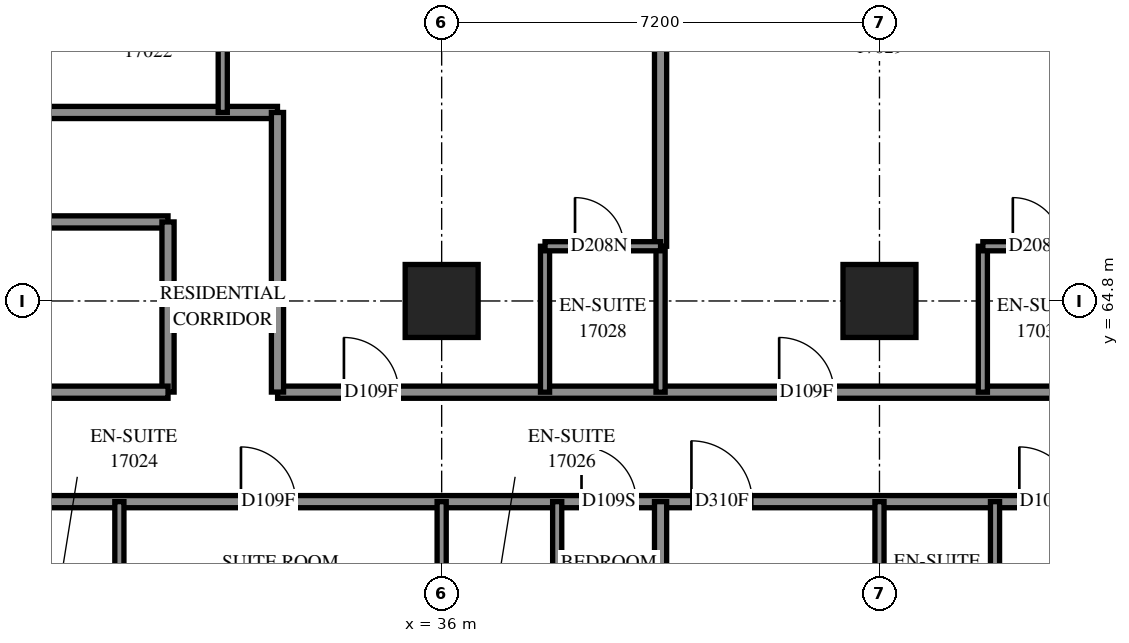
"""IFC4 building model, lengths in metres.
Left out: names, types, materials, properties, quantities, classifications, styles, units other than length and angle.
Written with IfcOpenShell. Run it as: python <this file> out.ifc"""

import sys

from ifc_helpers import new_model, si_unit, direction, frame, frame_2d, origin, origin_2d, place, context, subcontext, project, spatial, rectangle, extrude, element, fill, save


model = new_model("IFC4")
c1 = context("Model", 3, precision=1e-05, world=origin(), true_north=direction((0.0, 1.0)))
c2 = subcontext(c1, "Body", "Model", "MODEL_VIEW")
j1 = project(units=[si_unit("LENGTHUNIT", "METRE"), si_unit("PLANEANGLEUNIT", "RADIAN")], contexts=[c1])
p1 = place(None, origin())
s1 = spatial("IfcSite", under=j1, at=p1, CompositionType="ELEMENT")
p2 = place(p1, origin())
s2 = spatial("IfcBuilding", under=s1, at=p2, CompositionType="ELEMENT")
p3 = place(p2, frame((0.0, 0.0, 64.4)))
s3 = spatial("IfcBuildingStorey", under=s2, at=p3, CompositionType="ELEMENT", Elevation=64.4)
for number, where, z_axis, x_axis in (
    (1, (36.0, 64.8, 0.0), (0.0, 0.0, 1.0), (1.0, 0.0, 0.0)),
    (2, (43.2, 64.8, 0.0), (0.0, 0.0, 1.0), (1.0, 0.0, 0.0)),
):
    element("IfcColumn", number, at=place(p3, frame(where, z_axis=z_axis, x_axis=x_axis)), inside=s3, PredefinedType="COLUMN", context=c2, shape_type="SweptSolid", body=[
        extrude(rectangle(XDim=1.2, YDim=1.2, at=origin_2d()), origin(), (0.0, 0.0, 1.0), 3.1),
    ])
p4 = place(p3, frame((28.8, 61.5, 0.0), z_axis=(0.0, 0.0, 1.0), x_axis=(1.0, 0.0, 0.0)))
e3 = element("IfcWall", 3, at=p4, inside=s3, PredefinedType="PARTITIONING", context=c2, shape_type="SweptSolid", body=[
    extrude(rectangle(XDim=24.3, YDim=0.2, at=frame_2d((12.15, 0.0))), origin(), (0.0, 0.0, 1.0), 3.1),
])
p5 = place(p4, frame((3.899, 0.0, 0.0)))
e4 = element("IfcOpeningElement", 4, at=p5, cuts=e3, PredefinedType="OPENING", context=c2, shape_type="SweptSolid", body=[
    extrude(rectangle(XDim=0.9, YDim=2.1, at=frame_2d((0.45, 1.05))), frame((0.0, 0.11, 0.0), z_axis=(0.0, -1.0, 0.0), x_axis=(1.0, 0.0, 0.0)), (0.0, 0.0, 1.0), 0.22),
])
p6 = place(p4, frame((9.5, 0.0, 0.0)))
e5 = element("IfcOpeningElement", 5, at=p6, cuts=e3, PredefinedType="OPENING", context=c2, shape_type="SweptSolid", body=[
    extrude(rectangle(XDim=0.9, YDim=2.1, at=frame_2d((0.45, 1.05))), frame((0.0, 0.11, 0.0), z_axis=(0.0, -1.0, 0.0), x_axis=(1.0, 0.0, 0.0)), (0.0, 0.0, 1.0), 0.22),
])
p7 = place(p4, frame((11.307, 0.0, 0.0)))
e6 = element("IfcOpeningElement", 6, at=p7, cuts=e3, PredefinedType="OPENING", context=c2, shape_type="SweptSolid", body=[
    extrude(rectangle(XDim=1.0, YDim=2.1, at=frame_2d((0.5, 1.05))), frame((0.0, 0.11, 0.0), z_axis=(0.0, -1.0, 0.0), x_axis=(1.0, 0.0, 0.0)), (0.0, 0.0, 1.0), 0.22),
])
p8 = place(p4, frame((16.7, 0.0, 0.0)))
e7 = element("IfcOpeningElement", 7, at=p8, cuts=e3, PredefinedType="OPENING", context=c2, shape_type="SweptSolid", body=[
    extrude(rectangle(XDim=0.9, YDim=2.1, at=frame_2d((0.45, 1.05))), frame((0.0, 0.11, 0.0), z_axis=(0.0, -1.0, 0.0), x_axis=(1.0, 0.0, 0.0)), (0.0, 0.0, 1.0), 0.22),
])
p9 = place(p4, frame((18.508, 0.0, 0.0)))
e8 = element("IfcOpeningElement", 8, at=p9, cuts=e3, PredefinedType="OPENING", context=c2, shape_type="SweptSolid", body=[
    extrude(rectangle(XDim=1.0, YDim=2.1, at=frame_2d((0.5, 1.05))), frame((0.0, 0.11, 0.0), z_axis=(0.0, -1.0, 0.0), x_axis=(1.0, 0.0, 0.0)), (0.0, 0.0, 1.0), 0.22),
])
p10 = place(p4, frame((23.033, 0.0, 0.0)))
e9 = element("IfcOpeningElement", 9, at=p10, cuts=e3, PredefinedType="OPENING", context=c2, shape_type="SweptSolid", body=[
    extrude(rectangle(XDim=1.0, YDim=2.1, at=frame_2d((0.5, 1.05))), frame((0.0, 0.11, 0.0), z_axis=(0.0, -1.0, 0.0), x_axis=(1.0, 0.0, 0.0)), (0.0, 0.0, 1.0), 0.22),
])
p11 = place(p3, frame((33.302, 63.3, 0.0), z_axis=(0.0, 0.0, 1.0), x_axis=(1.0, 0.0, 0.0)))
e10 = element("IfcWall", 10, at=p11, inside=s3, PredefinedType="PARTITIONING", context=c2, shape_type="SweptSolid", body=[
    extrude(rectangle(XDim=21.798, YDim=0.2, at=frame_2d((10.899, 0.0))), origin(), (0.0, 0.0, 1.0), 3.1),
])
p12 = place(p11, frame((1.091, 0.0, 0.0)))
e11 = element("IfcOpeningElement", 11, at=p12, cuts=e10, PredefinedType="OPENING", context=c2, shape_type="SweptSolid", body=[
    extrude(rectangle(XDim=0.9, YDim=2.1, at=frame_2d((0.45, 1.05))), frame((0.0, 0.11, 0.0), z_axis=(0.0, -1.0, 0.0), x_axis=(1.0, 0.0, 0.0)), (0.0, 0.0, 1.0), 0.22),
])
p13 = place(p11, frame((8.248, 0.0, 0.0)))
e12 = element("IfcOpeningElement", 12, at=p13, cuts=e10, PredefinedType="OPENING", context=c2, shape_type="SweptSolid", body=[
    extrude(rectangle(XDim=0.9, YDim=2.1, at=frame_2d((0.45, 1.05))), frame((0.0, 0.11, 0.0), z_axis=(0.0, -1.0, 0.0), x_axis=(1.0, 0.0, 0.0)), (0.0, 0.0, 1.0), 0.22),
])
p14 = place(p11, frame((15.448, 0.0, 0.0)))
e13 = element("IfcOpeningElement", 13, at=p14, cuts=e10, PredefinedType="OPENING", context=c2, shape_type="SweptSolid", body=[
    extrude(rectangle(XDim=0.9, YDim=2.1, at=frame_2d((0.45, 1.05))), frame((0.0, 0.11, 0.0), z_axis=(0.0, -1.0, 0.0), x_axis=(1.0, 0.0, 0.0)), (0.0, 0.0, 1.0), 0.22),
])
p15 = place(p3, frame((21.602, 67.9, 0.0), z_axis=(0.0, 0.0, 1.0), x_axis=(1.0, 0.0, 0.0)))
e14 = element("IfcWall", 14, at=p15, inside=s3, PredefinedType="PARTITIONING", context=c2, shape_type="SweptSolid", body=[
    extrude(rectangle(XDim=11.698, YDim=0.2, at=frame_2d((5.849, 0.0))), origin(), (0.0, 0.0, 1.0), 3.1),
])
p16 = place(p15, frame((5.955, 0.0, 0.0)))
e15 = element("IfcOpeningElement", 15, at=p16, cuts=e14, PredefinedType="OPENING", context=c2, shape_type="SweptSolid", body=[
    extrude(rectangle(XDim=0.9, YDim=2.1, at=frame_2d((0.45, 1.05))), frame((0.0, 0.11, 0.0), z_axis=(0.0, -1.0, 0.0), x_axis=(1.0, 0.0, 0.0)), (0.0, 0.0, 1.0), 0.22),
])
p17 = place(p3, frame((21.6, 66.1, 0.0), z_axis=(0.0, 0.0, 1.0), x_axis=(1.0, 0.0, 0.0)))
e16 = element("IfcWall", 16, at=p17, inside=s3, PredefinedType="PARTITIONING", context=c2, shape_type="SweptSolid", body=[
    extrude(rectangle(XDim=9.9, YDim=0.2, at=frame_2d((4.95, 0.0))), origin(), (0.0, 0.0, 1.0), 3.1),
])
p18 = place(p17, frame((5.314, 0.0, 0.0)))
e17 = element("IfcOpeningElement", 17, at=p18, cuts=e16, PredefinedType="OPENING", context=c2, shape_type="SweptSolid", body=[
    extrude(rectangle(XDim=1.0, YDim=2.1, at=frame_2d((0.5, 1.05))), frame((0.0, 0.11, 0.0), z_axis=(0.0, -1.0, 0.0), x_axis=(1.0, 0.0, 0.0)), (0.0, 0.0, 1.0), 0.22),
])
p19 = place(p3, frame((39.6, 65.7, 0.0), z_axis=(0.0, 0.0, 1.0), x_axis=(0.0, 1.0, 0.0)))
e18 = element("IfcWall", 18, at=p19, inside=s3, PredefinedType="PARTITIONING", context=c2, shape_type="SweptSolid", body=[
    extrude(rectangle(XDim=7.168, YDim=0.2, at=frame_2d((3.584, 0.0))), origin(), (0.0, 0.0, 1.0), 3.1),
])
p20 = place(p3, frame((39.6, 55.717, 0.0), z_axis=(0.0, 0.0, 1.0), x_axis=(0.0, 1.0, 0.0)))
e19 = element("IfcWall", 19, at=p20, inside=s3, PredefinedType="PARTITIONING", context=c2, shape_type="SweptSolid", body=[
    extrude(rectangle(XDim=5.783, YDim=0.2, at=frame_2d((2.892, 0.0))), origin(), (0.0, 0.0, 1.0), 3.1),
])
p21 = place(p3, frame((33.3, 63.302, 0.0), z_axis=(0.0, 0.0, 1.0), x_axis=(0.0, 1.0, 0.0)))
e20 = element("IfcWall", 20, at=p21, inside=s3, PredefinedType="PARTITIONING", context=c2, shape_type="SweptSolid", body=[
    extrude(rectangle(XDim=4.598, YDim=0.2, at=frame_2d((2.299, 0.0))), origin(), (0.0, 0.0, 1.0), 3.1),
])
p22 = place(p3, frame((31.5, 63.302, 0.0), z_axis=(0.0, 0.0, 1.0), x_axis=(0.0, 1.0, 0.0)))
e21 = element("IfcWall", 21, at=p22, inside=s3, PredefinedType="PARTITIONING", context=c2, shape_type="SweptSolid", body=[
    extrude(rectangle(XDim=2.798, YDim=0.2, at=frame_2d((1.399, 0.0))), origin(), (0.0, 0.0, 1.0), 3.1),
])
p23 = place(p3, frame((28.802, 63.3, 0.0), z_axis=(0.0, 0.0, 1.0), x_axis=(1.0, 0.0, 0.0)))
e22 = element("IfcWall", 22, at=p23, inside=s3, PredefinedType="PARTITIONING", context=c2, shape_type="SweptSolid", body=[
    extrude(rectangle(XDim=2.698, YDim=0.2, at=frame_2d((1.349, 0.0))), origin(), (0.0, 0.0, 1.0), 3.1),
])
for number, where, z_axis, x_axis in (
    (23, (37.7, 63.3, 0.0), (0.0, 0.0, 1.0), (0.0, 1.0, 0.0)),
    (24, (39.6, 63.3, 0.0), (0.0, 0.0, 1.0), (0.0, 1.0, 0.0)),
    (25, (44.9, 63.3, 0.0), (0.0, 0.0, 1.0), (0.0, 1.0, 0.0)),
    (26, (30.7, 59.1, 0.0), (0.0, 0.0, 1.0), (0.0, 1.0, 0.0)),
    (27, (37.9, 59.1, 0.0), (0.0, 0.0, 1.0), (0.0, 1.0, 0.0)),
    (28, (36.0, 59.1, 0.0), (0.0, 0.0, 1.0), (0.0, 1.0, 0.0)),
    (29, (45.1, 59.1, 0.0), (0.0, 0.0, 1.0), (0.0, 1.0, 0.0)),
    (30, (43.2, 59.1, 0.0), (0.0, 0.0, 1.0), (0.0, 1.0, 0.0)),
    (31, (32.4, 67.9, 0.0), (0.0, 0.0, 1.0), (0.0, 1.0, 0.0)),
):
    element("IfcWall", number, at=place(p3, frame(where, z_axis=z_axis, x_axis=x_axis)), inside=s3, PredefinedType="PARTITIONING", context=c2, shape_type="SweptSolid", body=[
        extrude(rectangle(XDim=2.4, YDim=0.15, at=frame_2d((1.2, 0.0))), origin(), (0.0, 0.0, 1.0), 3.1),
    ])
p24 = place(p3, frame((37.7, 65.7, 0.0), z_axis=(0.0, 0.0, 1.0), x_axis=(1.0, 0.0, 0.0)))
e32 = element("IfcWall", 32, at=p24, inside=s3, PredefinedType="PARTITIONING", context=c2, shape_type="SweptSolid", body=[
    extrude(rectangle(XDim=1.9, YDim=0.15, at=frame_2d((0.95, 0.0))), origin(), (0.0, 0.0, 1.0), 3.1),
])
p25 = place(p24, frame((0.493, 0.0, 0.0)))
e33 = element("IfcOpeningElement", 33, at=p25, cuts=e32, PredefinedType="OPENING", context=c2, shape_type="SweptSolid", body=[
    extrude(rectangle(XDim=0.8, YDim=2.1, at=frame_2d((0.4, 1.05))), frame((0.0, 0.085, 0.0), z_axis=(0.0, -1.0, 0.0), x_axis=(1.0, 0.0, 0.0)), (0.0, 0.0, 1.0), 0.17),
])
p26 = place(p3, frame((44.9, 65.7, 0.0), z_axis=(0.0, 0.0, 1.0), x_axis=(1.0, 0.0, 0.0)))
e34 = element("IfcWall", 34, at=p26, inside=s3, PredefinedType="PARTITIONING", context=c2, shape_type="SweptSolid", body=[
    extrude(rectangle(XDim=1.9, YDim=0.15, at=frame_2d((0.95, 0.0))), origin(), (0.0, 0.0, 1.0), 3.1),
])
p27 = place(p26, frame((0.493, 0.0, 0.0)))
e35 = element("IfcOpeningElement", 35, at=p27, cuts=e34, PredefinedType="OPENING", context=c2, shape_type="SweptSolid", body=[
    extrude(rectangle(XDim=0.8, YDim=2.1, at=frame_2d((0.4, 1.05))), frame((0.0, 0.085, 0.0), z_axis=(0.0, -1.0, 0.0), x_axis=(1.0, 0.0, 0.0)), (0.0, 0.0, 1.0), 0.17),
])
p28 = place(p5, origin())
e36 = element("IfcDoor", 36, at=p28, inside=s3, OperationType="SINGLE_SWING_LEFT", PredefinedType="DOOR", context=c2, shape_type="SweptSolid", body=[
    extrude(rectangle(XDim=0.9, YDim=2.1, at=frame_2d((0.45, 1.05))), frame((0.0, 0.025, 0.0), z_axis=(0.0, -1.0, 0.0), x_axis=(1.0, 0.0, 0.0)), (0.0, 0.0, 1.0), 0.05),
])
fill(e4, e36)
p29 = place(p6, origin())
e37 = element("IfcDoor", 37, at=p29, inside=s3, OperationType="SINGLE_SWING_LEFT", PredefinedType="DOOR", context=c2, shape_type="SweptSolid", body=[
    extrude(rectangle(XDim=0.9, YDim=2.1, at=frame_2d((0.45, 1.05))), frame((0.0, 0.025, 0.0), z_axis=(0.0, -1.0, 0.0), x_axis=(1.0, 0.0, 0.0)), (0.0, 0.0, 1.0), 0.05),
])
fill(e5, e37)
p30 = place(p12, origin())
e38 = element("IfcDoor", 38, at=p30, inside=s3, OperationType="SINGLE_SWING_LEFT", PredefinedType="DOOR", context=c2, shape_type="SweptSolid", body=[
    extrude(rectangle(XDim=0.9, YDim=2.1, at=frame_2d((0.45, 1.05))), frame((0.0, 0.025, 0.0), z_axis=(0.0, -1.0, 0.0), x_axis=(1.0, 0.0, 0.0)), (0.0, 0.0, 1.0), 0.05),
])
fill(e11, e38)
p31 = place(p25, origin())
e39 = element("IfcDoor", 39, at=p31, inside=s3, OperationType="SINGLE_SWING_RIGHT", PredefinedType="DOOR", context=c2, shape_type="SweptSolid", body=[
    extrude(rectangle(XDim=0.8, YDim=2.1, at=frame_2d((0.4, 1.05))), frame((0.0, 0.025, 0.0), z_axis=(0.0, -1.0, 0.0), x_axis=(1.0, 0.0, 0.0)), (0.0, 0.0, 1.0), 0.05),
])
fill(e33, e39)
p32 = place(p13, origin())
e40 = element("IfcDoor", 40, at=p32, inside=s3, OperationType="SINGLE_SWING_LEFT", PredefinedType="DOOR", context=c2, shape_type="SweptSolid", body=[
    extrude(rectangle(XDim=0.9, YDim=2.1, at=frame_2d((0.45, 1.05))), frame((0.0, 0.025, 0.0), z_axis=(0.0, -1.0, 0.0), x_axis=(1.0, 0.0, 0.0)), (0.0, 0.0, 1.0), 0.05),
])
fill(e12, e40)
p33 = place(p27, origin())
e41 = element("IfcDoor", 41, at=p33, inside=s3, OperationType="SINGLE_SWING_RIGHT", PredefinedType="DOOR", context=c2, shape_type="SweptSolid", body=[
    extrude(rectangle(XDim=0.8, YDim=2.1, at=frame_2d((0.4, 1.05))), frame((0.0, 0.025, 0.0), z_axis=(0.0, -1.0, 0.0), x_axis=(1.0, 0.0, 0.0)), (0.0, 0.0, 1.0), 0.05),
])
fill(e35, e41)
p34 = place(p7, origin())
e42 = element("IfcDoor", 42, at=p34, inside=s3, OperationType="SINGLE_SWING_RIGHT", PredefinedType="DOOR", context=c2, shape_type="SweptSolid", body=[
    extrude(rectangle(XDim=1.0, YDim=2.1, at=frame_2d((0.5, 1.05))), frame((0.0, 0.025, 0.0), z_axis=(0.0, -1.0, 0.0), x_axis=(1.0, 0.0, 0.0)), (0.0, 0.0, 1.0), 0.05),
])
fill(e6, e42)
p35 = place(p8, origin())
e43 = element("IfcDoor", 43, at=p35, inside=s3, OperationType="SINGLE_SWING_LEFT", PredefinedType="DOOR", context=c2, shape_type="SweptSolid", body=[
    extrude(rectangle(XDim=0.9, YDim=2.1, at=frame_2d((0.45, 1.05))), frame((0.0, 0.025, 0.0), z_axis=(0.0, -1.0, 0.0), x_axis=(1.0, 0.0, 0.0)), (0.0, 0.0, 1.0), 0.05),
])
fill(e7, e43)
save(model, sys.argv[1])
